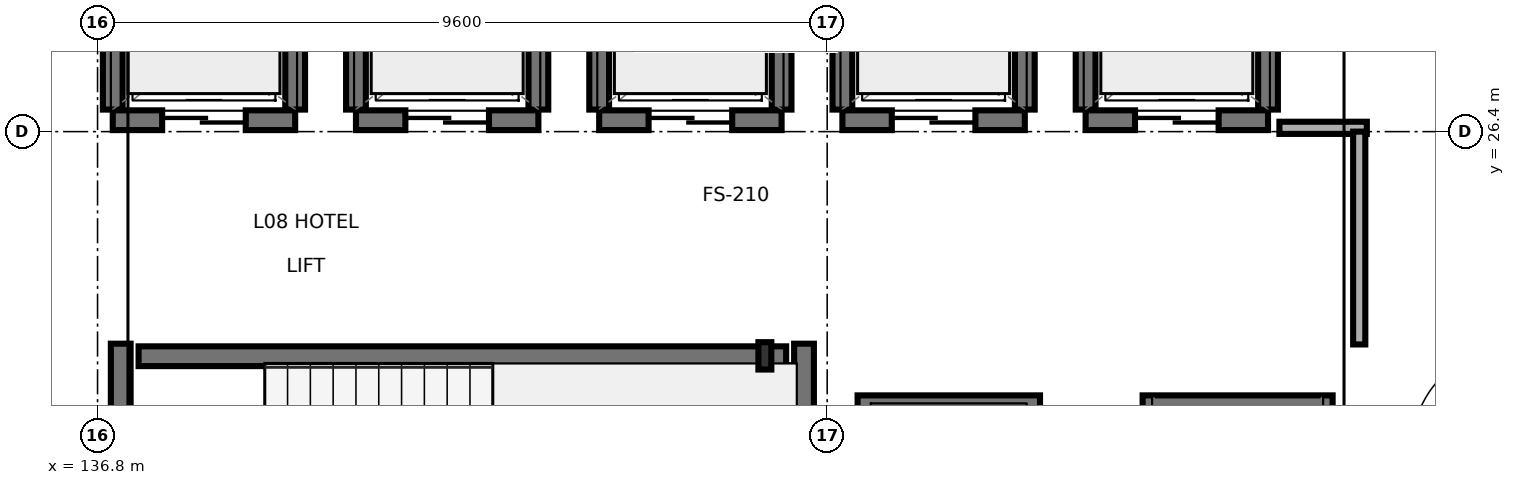
"""IFC4 building model, lengths in metres.
Left out: names, types, materials, properties, quantities, classifications, styles, units other than length and angle.
Written with IfcOpenShell. Run it as: python <this file> out.ifc"""

import sys

from ifc_helpers import new_model, si_unit, direction, frame, frame_2d, origin, origin_2d, place, context, subcontext, project, spatial, rectangle, i_section, extrude, element, fill, save


model = new_model("IFC4")
c1 = context("Model", 3, precision=1e-05, world=origin(), true_north=direction((0.0, 1.0)))
c2 = subcontext(c1, "Body", "Model", "MODEL_VIEW")
j1 = project(units=[si_unit("LENGTHUNIT", "METRE"), si_unit("PLANEANGLEUNIT", "RADIAN")], contexts=[c1])
p1 = place(None, origin())
s1 = spatial("IfcSite", under=j1, at=p1, CompositionType="ELEMENT")
p2 = place(p1, origin())
s2 = spatial("IfcBuilding", under=s1, at=p2, CompositionType="ELEMENT")
p3 = place(p2, frame((0.0, 0.0, 28.3)))
s3 = spatial("IfcBuildingStorey", under=s2, at=p3, CompositionType="ELEMENT", Elevation=28.3)
p4 = place(p3, frame((145.58, 23.45, 0.0), z_axis=(0.0, 0.0, 1.0), x_axis=(1.0, 0.0, 0.0)))
e1 = element("IfcColumn", 1, at=p4, inside=s3, PredefinedType="PILASTER", context=c2, shape_type="SweptSolid", body=[
    extrude(i_section(OverallWidth=0.17, OverallDepth=0.36, WebThickness=0.008, FlangeThickness=0.013, FilletRadius=0.018, at=origin_2d()), origin(), (0.0, 0.0, 1.0), 3.4),
])
p5 = place(p3, frame((137.105, 19.34, 0.0), z_axis=(0.0, 0.0, 1.0), x_axis=(0.0, 1.0, 0.0)))
e2 = element("IfcWall", 2, at=p5, inside=s3, PredefinedType="SHEAR", context=c2, shape_type="SweptSolid", body=[
    extrude(rectangle(XDim=4.27, YDim=0.26, at=frame_2d((2.135, 0.0))), origin(), (0.0, 0.0, 1.0), 3.175),
])
p6 = place(p5, frame((0.61, 0.0, 0.0)))
e3 = element("IfcOpeningElement", 3, at=p6, cuts=e2, PredefinedType="OPENING", context=c2, shape_type="SweptSolid", body=[
    extrude(rectangle(XDim=1.1, YDim=2.2, at=frame_2d((0.55, 1.1))), frame((0.0, 0.14, 0.0), z_axis=(0.0, -1.0, 0.0), x_axis=(1.0, 0.0, 0.0)), (0.0, 0.0, 1.0), 0.28),
])
p7 = place(p3, frame((146.095, 19.34, 0.0), z_axis=(0.0, 0.0, 1.0), x_axis=(0.0, 1.0, 0.0)))
e4 = element("IfcWall", 4, at=p7, inside=s3, PredefinedType="SHEAR", context=c2, shape_type="SweptSolid", body=[
    extrude(rectangle(XDim=4.27, YDim=0.26, at=frame_2d((2.135, 0.0))), origin(), (0.0, 0.0, 1.0), 3.175),
])
p8 = place(p3, frame((137.34, 23.445, 0.0), z_axis=(0.0, 0.0, 1.0), x_axis=(1.0, 0.0, 0.0)))
e5 = element("IfcWall", 5, at=p8, inside=s3, PredefinedType="SHEAR", context=c2, shape_type="SweptSolid", body=[
    extrude(rectangle(XDim=8.52, YDim=0.26, at=frame_2d((4.26, 0.0))), origin(), (0.0, 0.0, 1.0), 3.175),
])
p9 = place(p3, frame((137.0, 26.55, 0.0), z_axis=(0.0, 0.0, 1.0), x_axis=(1.0, 0.0, 0.0)))
e6 = element("IfcWall", 6, at=p9, inside=s3, PredefinedType="SHEAR", context=c2, shape_type="SweptSolid", body=[
    extrude(rectangle(XDim=2.4, YDim=0.26, at=frame_2d((1.2, 0.0))), origin(), (0.0, 0.0, 1.0), 2.71),
])
p10 = place(p9, frame((0.65, 0.0, 0.0)))
e7 = element("IfcOpeningElement", 7, at=p10, cuts=e6, PredefinedType="OPENING", context=c2, shape_type="SweptSolid", body=[
    extrude(rectangle(XDim=1.1, YDim=2.2, at=frame_2d((0.55, 1.1))), frame((0.0, 0.14, 0.0), z_axis=(0.0, -1.0, 0.0), x_axis=(1.0, 0.0, 0.0)), (0.0, 0.0, 1.0), 0.28),
])
for number, where, z_axis, x_axis in (
    (8, (137.0, 26.69, 0.0), (0.0, 0.0, 1.0), (0.0, 1.0, 0.0)),
    (9, (139.4, 26.69, 0.0), (0.0, 0.0, 1.0), (0.0, 1.0, 0.0)),
):
    element("IfcWall", number, at=place(p3, frame(where, z_axis=z_axis, x_axis=x_axis)), inside=s3, PredefinedType="SHEAR", context=c2, shape_type="SweptSolid", body=[
        extrude(rectangle(XDim=1.82, YDim=0.26, at=frame_2d((0.91, 0.0))), origin(), (0.0, 0.0, 1.0), 2.71),
    ])
p11 = place(p3, frame((140.2, 26.55, 0.0), z_axis=(0.0, 0.0, 1.0), x_axis=(1.0, 0.0, 0.0)))
e10 = element("IfcWall", 10, at=p11, inside=s3, PredefinedType="SHEAR", context=c2, shape_type="SweptSolid", body=[
    extrude(rectangle(XDim=2.4, YDim=0.26, at=frame_2d((1.2, 0.0))), origin(), (0.0, 0.0, 1.0), 3.175),
])
p12 = place(p11, frame((0.65, 0.0, 0.0)))
e11 = element("IfcOpeningElement", 11, at=p12, cuts=e10, PredefinedType="OPENING", context=c2, shape_type="SweptSolid", body=[
    extrude(rectangle(XDim=1.1, YDim=2.2, at=frame_2d((0.55, 1.1))), frame((0.0, 0.14, 0.0), z_axis=(0.0, -1.0, 0.0), x_axis=(1.0, 0.0, 0.0)), (0.0, 0.0, 1.0), 0.28),
])
for number, where, z_axis, x_axis in (
    (12, (140.2, 26.69, 0.0), (0.0, 0.0, 1.0), (0.0, 1.0, 0.0)),
    (13, (142.6, 26.69, 0.0), (0.0, 0.0, 1.0), (0.0, 1.0, 0.0)),
):
    element("IfcWall", number, at=place(p3, frame(where, z_axis=z_axis, x_axis=x_axis)), inside=s3, PredefinedType="SHEAR", context=c2, shape_type="SweptSolid", body=[
        extrude(rectangle(XDim=1.82, YDim=0.26, at=frame_2d((0.91, 0.0))), origin(), (0.0, 0.0, 1.0), 3.175),
    ])
p13 = place(p3, frame((143.4, 26.55, 0.0), z_axis=(0.0, 0.0, 1.0), x_axis=(1.0, 0.0, 0.0)))
e14 = element("IfcWall", 14, at=p13, inside=s3, PredefinedType="SHEAR", context=c2, shape_type="SweptSolid", body=[
    extrude(rectangle(XDim=2.4, YDim=0.26, at=frame_2d((1.2, 0.0))), origin(), (0.0, 0.0, 1.0), 3.175),
])
p14 = place(p13, frame((0.65, 0.0, 0.0)))
e15 = element("IfcOpeningElement", 15, at=p14, cuts=e14, PredefinedType="OPENING", context=c2, shape_type="SweptSolid", body=[
    extrude(rectangle(XDim=1.1, YDim=2.2, at=frame_2d((0.55, 1.1))), frame((0.0, 0.14, 0.0), z_axis=(0.0, -1.0, 0.0), x_axis=(1.0, 0.0, 0.0)), (0.0, 0.0, 1.0), 0.28),
])
for number, where, z_axis, x_axis in (
    (16, (143.4, 26.69, 0.0), (0.0, 0.0, 1.0), (0.0, 1.0, 0.0)),
    (17, (145.8, 26.69, 0.0), (0.0, 0.0, 1.0), (0.0, 1.0, 0.0)),
):
    element("IfcWall", number, at=place(p3, frame(where, z_axis=z_axis, x_axis=x_axis)), inside=s3, PredefinedType="SHEAR", context=c2, shape_type="SweptSolid", body=[
        extrude(rectangle(XDim=1.82, YDim=0.26, at=frame_2d((0.91, 0.0))), origin(), (0.0, 0.0, 1.0), 3.175),
    ])
p15 = place(p3, frame((146.6, 26.55, 0.0), z_axis=(0.0, 0.0, 1.0), x_axis=(1.0, 0.0, 0.0)))
e18 = element("IfcWall", 18, at=p15, inside=s3, PredefinedType="SHEAR", context=c2, shape_type="SweptSolid", body=[
    extrude(rectangle(XDim=2.4, YDim=0.26, at=frame_2d((1.2, 0.0))), origin(), (0.0, 0.0, 1.0), 3.175),
])
p16 = place(p15, frame((0.65, 0.0, 0.0)))
e19 = element("IfcOpeningElement", 19, at=p16, cuts=e18, PredefinedType="OPENING", context=c2, shape_type="SweptSolid", body=[
    extrude(rectangle(XDim=1.1, YDim=2.2, at=frame_2d((0.55, 1.1))), frame((0.0, 0.14, 0.0), z_axis=(0.0, -1.0, 0.0), x_axis=(1.0, 0.0, 0.0)), (0.0, 0.0, 1.0), 0.28),
])
for number, where, z_axis, x_axis in (
    (20, (146.6, 26.69, 0.0), (0.0, 0.0, 1.0), (0.0, 1.0, 0.0)),
    (21, (149.0, 26.69, 0.0), (0.0, 0.0, 1.0), (0.0, 1.0, 0.0)),
):
    element("IfcWall", number, at=place(p3, frame(where, z_axis=z_axis, x_axis=x_axis)), inside=s3, PredefinedType="SHEAR", context=c2, shape_type="SweptSolid", body=[
        extrude(rectangle(XDim=1.82, YDim=0.26, at=frame_2d((0.91, 0.0))), origin(), (0.0, 0.0, 1.0), 3.175),
    ])
p17 = place(p3, frame((149.8, 26.55, 0.0), z_axis=(0.0, 0.0, 1.0), x_axis=(1.0, 0.0, 0.0)))
e22 = element("IfcWall", 22, at=p17, inside=s3, PredefinedType="SHEAR", context=c2, shape_type="SweptSolid", body=[
    extrude(rectangle(XDim=2.4, YDim=0.26, at=frame_2d((1.2, 0.0))), origin(), (0.0, 0.0, 1.0), 3.175),
])
p18 = place(p17, frame((0.65, 0.0, 0.0)))
e23 = element("IfcOpeningElement", 23, at=p18, cuts=e22, PredefinedType="OPENING", context=c2, shape_type="SweptSolid", body=[
    extrude(rectangle(XDim=1.1, YDim=2.2, at=frame_2d((0.55, 1.1))), frame((0.0, 0.14, 0.0), z_axis=(0.0, -1.0, 0.0), x_axis=(1.0, 0.0, 0.0)), (0.0, 0.0, 1.0), 0.28),
])
for number, where, z_axis, x_axis in (
    (24, (149.8, 26.69, 0.0), (0.0, 0.0, 1.0), (0.0, 1.0, 0.0)),
    (25, (152.2, 26.69, 0.0), (0.0, 0.0, 1.0), (0.0, 1.0, 0.0)),
):
    element("IfcWall", number, at=place(p3, frame(where, z_axis=z_axis, x_axis=x_axis)), inside=s3, PredefinedType="SHEAR", context=c2, shape_type="SweptSolid", body=[
        extrude(rectangle(XDim=1.82, YDim=0.26, at=frame_2d((0.91, 0.0))), origin(), (0.0, 0.0, 1.0), 3.175),
    ])
p19 = place(p3, frame((146.8, 22.8, 0.0), z_axis=(0.0, 0.0, 1.0), x_axis=(1.0, 0.0, 0.0)))
e26 = element("IfcWall", 26, at=p19, inside=s3, PredefinedType="SHEAR", context=c2, shape_type="SweptSolid", body=[
    extrude(rectangle(XDim=2.4, YDim=0.26, at=frame_2d((1.2, 0.0))), origin(), (0.0, 0.0, 1.0), 3.175),
])
p20 = place(p3, frame((150.55, 22.8, 0.0), z_axis=(0.0, 0.0, 1.0), x_axis=(1.0, 0.0, 0.0)))
e27 = element("IfcWall", 27, at=p20, inside=s3, PredefinedType="SHEAR", context=c2, shape_type="SweptSolid", body=[
    extrude(rectangle(XDim=2.5, YDim=0.26, at=frame_2d((1.25, 0.0))), origin(), (0.0, 0.0, 1.0), 3.175),
])
p21 = place(p3, frame((152.35, 26.45, 0.0), z_axis=(0.0, 0.0, 1.0), x_axis=(1.0, 0.0, 0.0)))
e28 = element("IfcWall", 28, at=p21, inside=s3, PredefinedType="PARTITIONING", context=c2, shape_type="SweptSolid", body=[
    extrude(rectangle(XDim=1.15, YDim=0.16, at=frame_2d((0.575, 0.0))), origin(), (0.0, 0.0, 1.0), 3.175),
])
p22 = place(p3, frame((153.4, 23.6, 0.0), z_axis=(0.0, 0.0, 1.0), x_axis=(0.0, 1.0, 0.0)))
e29 = element("IfcWall", 29, at=p22, inside=s3, PredefinedType="PARTITIONING", context=c2, shape_type="SweptSolid", body=[
    extrude(rectangle(XDim=2.8, YDim=0.16, at=frame_2d((1.4, 0.0))), origin(), (0.0, 0.0, 1.0), 3.175),
])
p23 = place(p10, origin())
e30 = element("IfcDoor", 30, at=p23, inside=s3, OperationType="SLIDING_TO_LEFT", PredefinedType="DOOR", context=c2, shape_type="SweptSolid", body=[
    extrude(rectangle(XDim=1.1, YDim=2.2, at=frame_2d((0.55, 1.1))), frame((0.0, 0.025, 0.0), z_axis=(0.0, -1.0, 0.0), x_axis=(1.0, 0.0, 0.0)), (0.0, 0.0, 1.0), 0.05),
])
fill(e7, e30)
p24 = place(p12, origin())
e31 = element("IfcDoor", 31, at=p24, inside=s3, OperationType="SLIDING_TO_RIGHT", PredefinedType="DOOR", context=c2, shape_type="SweptSolid", body=[
    extrude(rectangle(XDim=1.1, YDim=2.2, at=frame_2d((0.55, 1.1))), frame((0.0, 0.025, 0.0), z_axis=(0.0, -1.0, 0.0), x_axis=(1.0, 0.0, 0.0)), (0.0, 0.0, 1.0), 0.05),
])
fill(e11, e31)
p25 = place(p14, origin())
e32 = element("IfcDoor", 32, at=p25, inside=s3, OperationType="SLIDING_TO_LEFT", PredefinedType="DOOR", context=c2, shape_type="SweptSolid", body=[
    extrude(rectangle(XDim=1.1, YDim=2.2, at=frame_2d((0.55, 1.1))), frame((0.0, 0.025, 0.0), z_axis=(0.0, -1.0, 0.0), x_axis=(1.0, 0.0, 0.0)), (0.0, 0.0, 1.0), 0.05),
])
fill(e15, e32)
p26 = place(p16, origin())
e33 = element("IfcDoor", 33, at=p26, inside=s3, OperationType="SLIDING_TO_RIGHT", PredefinedType="DOOR", context=c2, shape_type="SweptSolid", body=[
    extrude(rectangle(XDim=1.1, YDim=2.2, at=frame_2d((0.55, 1.1))), frame((0.0, 0.025, 0.0), z_axis=(0.0, -1.0, 0.0), x_axis=(1.0, 0.0, 0.0)), (0.0, 0.0, 1.0), 0.05),
])
fill(e19, e33)
p27 = place(p18, origin())
e34 = element("IfcDoor", 34, at=p27, inside=s3, OperationType="SLIDING_TO_LEFT", PredefinedType="DOOR", context=c2, shape_type="SweptSolid", body=[
    extrude(rectangle(XDim=1.1, YDim=2.2, at=frame_2d((0.55, 1.1))), frame((0.0, 0.025, 0.0), z_axis=(0.0, -1.0, 0.0), x_axis=(1.0, 0.0, 0.0)), (0.0, 0.0, 1.0), 0.05),
])
fill(e23, e34)
save(model, sys.argv[1])
